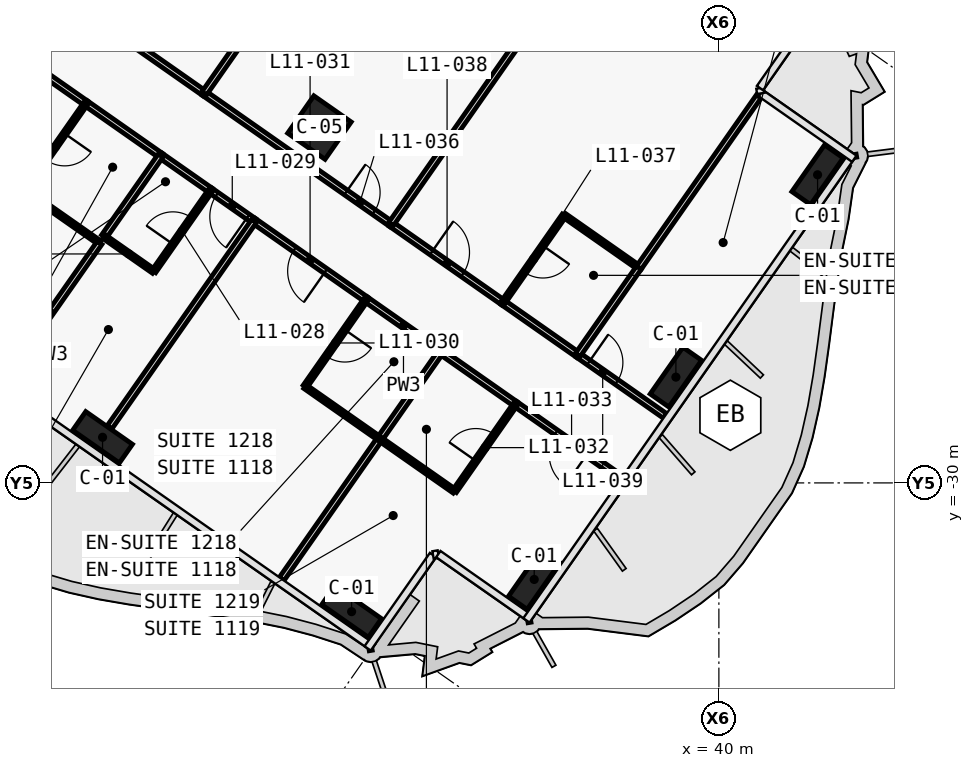
"""IFC4 building model, lengths in metres.
Left out: names, types, materials, properties, quantities, classifications, styles, units other than length and angle.
Written with IfcOpenShell. Run it as: python <this file> out.ifc"""

import sys

from ifc_helpers import new_model, si_unit, direction, frame, frame_2d, origin, origin_2d, place, context, subcontext, project, spatial, rectangle, extrude, element, fill, save


model = new_model("IFC4")
c1 = context("Model", 3, precision=1e-05, world=origin(), true_north=direction((0.0, 1.0)))
c2 = subcontext(c1, "Body", "Model", "MODEL_VIEW")
j1 = project(units=[si_unit("LENGTHUNIT", "METRE"), si_unit("PLANEANGLEUNIT", "RADIAN")], contexts=[c1])
p1 = place(None, origin())
s1 = spatial("IfcSite", under=j1, at=p1, CompositionType="ELEMENT")
p2 = place(p1, origin())
s2 = spatial("IfcBuilding", under=s1, at=p2, CompositionType="ELEMENT")
p3 = place(p2, frame((0.0, 0.0, 65.3)))
s3 = spatial("IfcBuildingStorey", under=s2, at=p3, CompositionType="ELEMENT", Elevation=65.3)
for number, where, z_axis, x_axis in (
    (1, (23.782, -28.799, 0.0), (0.0, 0.0, 1.0), (0.819, -0.574, 0.0)),
    (2, (30.336, -33.388, 0.0), (0.0, 0.0, 1.0), (0.819, -0.574, 0.0)),
    (3, (35.14, -32.541, 0.0), (0.0, 0.0, 1.0), (0.574, 0.819, 0.0)),
    (4, (38.869, -27.216, 0.0), (0.0, 0.0, 1.0), (0.574, 0.819, 0.0)),
    (5, (42.597, -21.892, 0.0), (0.0, 0.0, 1.0), (0.574, 0.819, 0.0)),
):
    element("IfcColumn", number, at=place(p3, frame(where, z_axis=z_axis, x_axis=x_axis)), inside=s3, PredefinedType="COLUMN", context=c2, shape_type="SweptSolid", body=[
        extrude(rectangle(XDim=1.5, YDim=0.6, at=origin_2d()), origin(), (0.0, 0.0, 1.0), 3.6),
    ])
p4 = place(p3, frame((29.49, -20.649, 0.0), z_axis=(0.0, 0.0, 1.0), x_axis=(0.819152044289, -0.573576436351, 0.0)))
e6 = element("IfcColumn", 6, at=p4, inside=s3, PredefinedType="COLUMN", context=c2, shape_type="SweptSolid", body=[
    extrude(rectangle(XDim=1.2, YDim=1.2, at=origin_2d()), origin(), (0.0, 0.0, 1.0), 3.6),
])
p5 = place(p3, frame((24.491, -18.369, 0.0), z_axis=(0.0, 0.0, 1.0), x_axis=(0.819179439794, -0.573537309527, 0.0)))
e7 = element("IfcWall", 7, at=p5, inside=s3, PredefinedType="PARTITIONING", context=c2, shape_type="SweptSolid", body=[
    extrude(rectangle(XDim=2.404, YDim=0.15, at=frame_2d((1.202, 0.0))), origin(), (0.0, 0.0, 1.0), 3.32),
])
p6 = place(p3, frame((26.457, -19.746, 0.0), z_axis=(0.0, 0.0, 1.0), x_axis=(0.819165052243, -0.573557858619, 0.0)))
e8 = element("IfcWall", 8, at=p6, inside=s3, PredefinedType="PARTITIONING", context=c2, shape_type="SweptSolid", body=[
    extrude(rectangle(XDim=6.004, YDim=0.15, at=frame_2d((3.002, 0.0))), origin(), (0.0, 0.0, 1.0), 2.6),
])
p7 = place(p6, frame((4.552, 0.0, 0.0)))
e9 = element("IfcOpeningElement", 9, at=p7, cuts=e8, PredefinedType="OPENING", context=c2, shape_type="SweptSolid", body=[
    extrude(rectangle(XDim=0.9, YDim=2.1, at=frame_2d((0.45, 1.05))), frame((0.0, 0.085, 0.0), z_axis=(0.0, -1.0, 0.0), x_axis=(1.0, 0.0, 0.0)), (0.0, 0.0, 1.0), 0.17),
])
p8 = place(p3, frame((31.372, -23.188, 0.0), z_axis=(0.0, 0.0, 1.0), x_axis=(0.819145961204, -0.573585123798, 0.0)))
e10 = element("IfcWall", 10, at=p8, inside=s3, PredefinedType="PARTITIONING", context=c2, shape_type="SweptSolid", body=[
    extrude(rectangle(XDim=3.603, YDim=0.15, at=frame_2d((1.802, 0.0))), origin(), (0.0, 0.0, 1.0), 3.32),
])
p9 = place(p8, frame((1.302, 0.0, 0.0)))
e11 = element("IfcOpeningElement", 11, at=p9, cuts=e10, PredefinedType="OPENING", context=c2, shape_type="SweptSolid", body=[
    extrude(rectangle(XDim=1.0, YDim=2.1, at=frame_2d((0.5, 1.05))), frame((0.0, 0.085, 0.0), z_axis=(0.0, -1.0, 0.0), x_axis=(1.0, 0.0, 0.0)), (0.0, 0.0, 1.0), 0.17),
])
p10 = place(p3, frame((34.321, -25.252, 0.0), z_axis=(0.0, 0.0, 1.0), x_axis=(0.819160338113, -0.573564591361, 0.0)))
e12 = element("IfcWall", 12, at=p10, inside=s3, PredefinedType="PARTITIONING", context=c2, shape_type="SweptSolid", body=[
    extrude(rectangle(XDim=2.404, YDim=0.15, at=frame_2d((1.202, 0.0))), origin(), (0.0, 0.0, 1.0), 3.32),
])
p11 = place(p3, frame((36.287, -26.629, 0.0), z_axis=(0.0, 0.0, 1.0), x_axis=(0.819137759006, -0.573596837309, 0.0)))
e13 = element("IfcWall", 13, at=p11, inside=s3, PredefinedType="PARTITIONING", context=c2, shape_type="SweptSolid", body=[
    extrude(rectangle(XDim=2.802, YDim=0.15, at=frame_2d((1.401, 0.0))), origin(), (0.0, 0.0, 1.0), 2.5),
])
p12 = place(p11, frame((0.351, 0.0, 0.0)))
e14 = element("IfcOpeningElement", 14, at=p12, cuts=e13, PredefinedType="OPENING", context=c2, shape_type="SweptSolid", body=[
    extrude(rectangle(XDim=0.9, YDim=2.1, at=frame_2d((0.45, 1.05))), frame((0.0, 0.085, 0.0), z_axis=(0.0, -1.0, 0.0), x_axis=(1.0, 0.0, 0.0)), (0.0, 0.0, 1.0), 0.17),
])
p13 = place(p3, frame((23.346, -20.01, 0.0), z_axis=(0.0, 0.0, 1.0), x_axis=(-0.819153746897, 0.573574004767, 0.0)))
e15 = element("IfcWall", 15, at=p13, inside=s3, PredefinedType="PARTITIONING", context=c2, shape_type="SweptSolid", body=[
    extrude(rectangle(XDim=6.603, YDim=0.15, at=frame_2d((3.302, 0.0))), origin(), (0.0, 0.0, 1.0), 2.6),
])
p14 = place(p13, frame((2.801, 0.0, 0.0)))
e16 = element("IfcOpeningElement", 16, at=p14, cuts=e15, PredefinedType="OPENING", context=c2, shape_type="SweptSolid", body=[
    extrude(rectangle(XDim=1.0, YDim=2.1, at=frame_2d((0.5, 1.05))), frame((0.0, 0.085, 0.0), z_axis=(0.0, -1.0, 0.0), x_axis=(1.0, 0.0, 0.0)), (0.0, 0.0, 1.0), 0.17),
])
p15 = place(p3, frame((25.313, -21.387, 0.0), z_axis=(0.0, 0.0, 1.0), x_axis=(-0.819146032251, 0.573585022335, 0.0)))
e17 = element("IfcWall", 17, at=p15, inside=s3, PredefinedType="PARTITIONING", context=c2, shape_type="SweptSolid", body=[
    extrude(rectangle(XDim=2.404, YDim=0.15, at=frame_2d((1.202, 0.0))), origin(), (0.0, 0.0, 1.0), 3.32),
])
p16 = place(p3, frame((27.771, -23.107, 0.0), z_axis=(0.0, 0.0, 1.0), x_axis=(-0.819117471667, 0.573625808005, 0.0)))
e18 = element("IfcWall", 18, at=p16, inside=s3, PredefinedType="PARTITIONING", context=c2, shape_type="SweptSolid", body=[
    extrude(rectangle(XDim=1.403, YDim=0.15, at=frame_2d((0.702, 0.0))), origin(), (0.0, 0.0, 1.0), 2.6),
])
p17 = place(p16, frame((0.202, 0.0, 0.0)))
e19 = element("IfcOpeningElement", 19, at=p17, cuts=e18, PredefinedType="OPENING", context=c2, shape_type="SweptSolid", body=[
    extrude(rectangle(XDim=1.0, YDim=2.1, at=frame_2d((0.5, 1.05))), frame((0.0, 0.085, 0.0), z_axis=(0.0, -1.0, 0.0), x_axis=(1.0, 0.0, 0.0)), (0.0, 0.0, 1.0), 0.17),
])
p18 = place(p3, frame((26.624, -22.304, 0.0), z_axis=(0.0, 0.0, 1.0), x_axis=(-0.819189013667, 0.573523634986, 0.0)))
e20 = element("IfcWall", 20, at=p18, inside=s3, PredefinedType="PARTITIONING", context=c2, shape_type="SweptSolid", body=[
    extrude(rectangle(XDim=1.604, YDim=0.15, at=frame_2d((0.802, 0.0))), origin(), (0.0, 0.0, 1.0), 3.32),
])
p19 = place(p3, frame((30.719, -25.172, 0.0), z_axis=(0.0, 0.0, 1.0), x_axis=(-0.819145961204, 0.573585123798, 0.0)))
e21 = element("IfcWall", 21, at=p19, inside=s3, PredefinedType="PARTITIONING", context=c2, shape_type="SweptSolid", body=[
    extrude(rectangle(XDim=3.603, YDim=0.15, at=frame_2d((1.802, 0.0))), origin(), (0.0, 0.0, 1.0), 2.6),
])
p20 = place(p19, frame((1.301, 0.0, 0.0)))
e22 = element("IfcOpeningElement", 22, at=p20, cuts=e21, PredefinedType="OPENING", context=c2, shape_type="SweptSolid", body=[
    extrude(rectangle(XDim=1.0, YDim=2.1, at=frame_2d((0.5, 1.05))), frame((0.0, 0.085, 0.0), z_axis=(0.0, -1.0, 0.0), x_axis=(1.0, 0.0, 0.0)), (0.0, 0.0, 1.0), 0.17),
])
p21 = place(p3, frame((32.685, -26.549, 0.0), z_axis=(0.0, 0.0, 1.0), x_axis=(-0.819146032251, 0.573585022335, 0.0)))
e23 = element("IfcWall", 23, at=p21, inside=s3, PredefinedType="PARTITIONING", context=c2, shape_type="SweptSolid", body=[
    extrude(rectangle(XDim=2.404, YDim=0.15, at=frame_2d((1.202, 0.0))), origin(), (0.0, 0.0, 1.0), 3.32),
])
p22 = place(p3, frame((37.435, -29.875, 0.0), z_axis=(0.0, 0.0, 1.0), x_axis=(-0.819144234337, 0.573587589957, 0.0)))
e24 = element("IfcWall", 24, at=p22, inside=s3, PredefinedType="PARTITIONING", context=c2, shape_type="SweptSolid", body=[
    extrude(rectangle(XDim=3.401, YDim=0.15, at=frame_2d((1.701, 0.0))), origin(), (0.0, 0.0, 1.0), 2.5),
])
p23 = place(p22, frame((1.1, 0.0, 0.0)))
e25 = element("IfcOpeningElement", 25, at=p23, cuts=e24, PredefinedType="OPENING", context=c2, shape_type="SweptSolid", body=[
    extrude(rectangle(XDim=1.0, YDim=2.1, at=frame_2d((0.5, 1.05))), frame((0.0, 0.085, 0.0), z_axis=(0.0, -1.0, 0.0), x_axis=(1.0, 0.0, 0.0)), (0.0, 0.0, 1.0), 0.17),
])
p24 = place(p3, frame((34.651, -27.925, 0.0), z_axis=(0.0, 0.0, 1.0), x_axis=(-0.819179439794, 0.573537309527, 0.0)))
e26 = element("IfcWall", 26, at=p24, inside=s3, PredefinedType="PARTITIONING", context=c2, shape_type="SweptSolid", body=[
    extrude(rectangle(XDim=2.404, YDim=0.15, at=frame_2d((1.202, 0.0))), origin(), (0.0, 0.0, 1.0), 3.32),
])
p25 = place(p3, frame((28.064, -17.454, 0.0), z_axis=(0.0, 0.0, 1.0), x_axis=(-0.573550118428, -0.819170471667, 0.0)))
e27 = element("IfcWall", 27, at=p25, inside=s3, PredefinedType="PARTITIONING", context=c2, shape_type="SweptSolid", body=[
    extrude(rectangle(XDim=2.8, YDim=0.15, at=frame_2d((1.4, 0.0))), origin(), (0.0, 0.0, 1.0), 2.6),
])
p26 = place(p3, frame((37.855, -13.932, 0.0), z_axis=(0.0, 0.0, 1.0), x_axis=(-0.573571089604, -0.819155788095, 0.0)))
e28 = element("IfcWall", 28, at=p26, inside=s3, PredefinedType="PARTITIONING", context=c2, shape_type="SweptSolid", body=[
    extrude(rectangle(XDim=11.3, YDim=0.15, at=frame_2d((5.65, 0.0))), origin(), (0.0, 0.0, 1.0), 2.5),
])
p27 = place(p3, frame((37.895, -24.336, 0.0), z_axis=(0.0, 0.0, 1.0), x_axis=(-0.819141114317, 0.573592045652, 0.0)))
e29 = element("IfcWall", 29, at=p27, inside=s3, PredefinedType="PARTITIONING", context=c2, shape_type="SweptSolid", body=[
    extrude(rectangle(XDim=2.4, YDim=0.12, at=frame_2d((1.2, 0.0))), origin(), (0.0, 0.0, 1.0), 3.32),
])
p28 = place(p3, frame((35.927, -22.959, 0.0), z_axis=(0.0, 0.0, 1.0), x_axis=(-0.573550118428, -0.819170471667, 0.0)))
e30 = element("IfcWall", 30, at=p28, inside=s3, PredefinedType="PARTITIONING", context=c2, shape_type="SweptSolid", body=[
    extrude(rectangle(XDim=2.8, YDim=0.12, at=frame_2d((1.4, 0.0))), origin(), (0.0, 0.0, 1.0), 2.6),
])
p29 = place(p28, frame((0.975, 0.0, 0.0)))
e31 = element("IfcOpeningElement", 31, at=p29, cuts=e30, PredefinedType="OPENING", context=c2, shape_type="SweptSolid", body=[
    extrude(rectangle(XDim=0.85, YDim=2.05, at=frame_2d((0.425, 1.025))), frame((0.0, 0.07, 0.0), z_axis=(0.0, -1.0, 0.0), x_axis=(1.0, 0.0, 0.0)), (0.0, 0.0, 1.0), 0.14),
])
p30 = place(p3, frame((41.049, -19.831, 0.0), z_axis=(0.0, 0.0, 1.0), x_axis=(-0.573530875885, -0.819183944183, 0.0)))
e32 = element("IfcWall", 32, at=p30, inside=s3, PredefinedType="PARTITIONING", context=c2, shape_type="SweptSolid", body=[
    extrude(rectangle(XDim=5.499, YDim=0.15, at=frame_2d((2.75, 0.0))), origin(), (0.0, 0.0, 1.0), 3.32),
])
p31 = place(p3, frame((37.894, -24.336, 0.0), z_axis=(0.0, 0.0, 1.0), x_axis=(-0.573550118428, -0.819170471667, 0.0)))
e33 = element("IfcWall", 33, at=p31, inside=s3, PredefinedType="PARTITIONING", context=c2, shape_type="SweptSolid", body=[
    extrude(rectangle(XDim=2.8, YDim=0.15, at=frame_2d((1.4, 0.0))), origin(), (0.0, 0.0, 1.0), 2.6),
])
p32 = place(p3, frame((23.344, -20.008, 0.0), z_axis=(0.0, 0.0, 1.0), x_axis=(-0.573550118428, -0.819170471667, 0.0)))
e34 = element("IfcWall", 34, at=p32, inside=s3, PredefinedType="PARTITIONING", context=c2, shape_type="SweptSolid", body=[
    extrude(rectangle(XDim=2.8, YDim=0.12, at=frame_2d((1.4, 0.0))), origin(), (0.0, 0.0, 1.0), 3.32),
])
p33 = place(p32, frame((0.975, 0.0, 0.0)))
e35 = element("IfcOpeningElement", 35, at=p33, cuts=e34, PredefinedType="OPENING", context=c2, shape_type="SweptSolid", body=[
    extrude(rectangle(XDim=0.85, YDim=2.05, at=frame_2d((0.425, 1.025))), frame((0.0, 0.07, 0.0), z_axis=(0.0, -1.0, 0.0), x_axis=(1.0, 0.0, 0.0)), (0.0, 0.0, 1.0), 0.14),
])
p34 = place(p3, frame((21.739, -22.303, 0.0), z_axis=(0.0, 0.0, 1.0), x_axis=(0.819107643868, -0.573639841501, 0.0)))
e36 = element("IfcWall", 36, at=p34, inside=s3, PredefinedType="PARTITIONING", context=c2, shape_type="SweptSolid", body=[
    extrude(rectangle(XDim=2.4, YDim=0.12, at=frame_2d((1.2, 0.0))), origin(), (0.0, 0.0, 1.0), 3.32),
])
p35 = place(p3, frame((23.705, -23.68, 0.0), z_axis=(0.0, 0.0, 1.0), x_axis=(-0.573553393703, -0.819168178442, 0.0)))
e37 = element("IfcWall", 37, at=p35, inside=s3, PredefinedType="PARTITIONING", context=c2, shape_type="SweptSolid", body=[
    extrude(rectangle(XDim=4.499, YDim=0.15, at=frame_2d((2.25, 0.0))), origin(), (0.0, 0.0, 1.0), 2.5),
])
p36 = place(p3, frame((25.311, -21.385, 0.0), z_axis=(0.0, 0.0, 1.0), x_axis=(-0.573588285102, -0.819143747577, 0.0)))
e38 = element("IfcWall", 38, at=p36, inside=s3, PredefinedType="PARTITIONING", context=c2, shape_type="SweptSolid", body=[
    extrude(rectangle(XDim=2.602, YDim=0.15, at=frame_2d((1.301, 0.0))), origin(), (0.0, 0.0, 1.0), 3.32),
])
p37 = place(p3, frame((23.819, -23.516, 0.0), z_axis=(0.0, 0.0, 1.0), x_axis=(0.81918174131, -0.573534022273, 0.0)))
e39 = element("IfcWall", 39, at=p37, inside=s3, PredefinedType="PARTITIONING", context=c2, shape_type="SweptSolid", body=[
    extrude(rectangle(XDim=1.6, YDim=0.12, at=frame_2d((0.8, 0.0))), origin(), (0.0, 0.0, 1.0), 3.32),
])
p38 = place(p3, frame((25.132, -24.434, 0.0), z_axis=(0.0, 0.0, 1.0), x_axis=(0.573537965655, 0.819178980414, 0.0)))
e40 = element("IfcWall", 40, at=p38, inside=s3, PredefinedType="PARTITIONING", context=c2, shape_type="SweptSolid", body=[
    extrude(rectangle(XDim=2.6, YDim=0.12, at=frame_2d((1.3, 0.0))), origin(), (0.0, 0.0, 1.0), 3.32),
])
p39 = place(p38, frame((0.875, 0.0, 0.0)))
e41 = element("IfcOpeningElement", 41, at=p39, cuts=e40, PredefinedType="OPENING", context=c2, shape_type="SweptSolid", body=[
    extrude(rectangle(XDim=0.85, YDim=2.05, at=frame_2d((0.425, 1.025))), frame((0.0, 0.07, 0.0), z_axis=(0.0, -1.0, 0.0), x_axis=(1.0, 0.0, 0.0)), (0.0, 0.0, 1.0), 0.14),
])
p40 = place(p3, frame((27.769, -23.106, 0.0), z_axis=(0.0, 0.0, 1.0), x_axis=(-0.57359826181, -0.819136761505, 0.0)))
e42 = element("IfcWall", 42, at=p40, inside=s3, PredefinedType="PARTITIONING", context=c2, shape_type="SweptSolid", body=[
    extrude(rectangle(XDim=6.63, YDim=0.15, at=frame_2d((3.315, 0.0))), origin(), (0.0, 0.0, 1.0), 2.6),
])
p41 = place(p3, frame((30.717, -25.17, 0.0), z_axis=(0.0, 0.0, 1.0), x_axis=(-0.573550118428, -0.819170471667, 0.0)))
e43 = element("IfcWall", 43, at=p41, inside=s3, PredefinedType="PARTITIONING", context=c2, shape_type="SweptSolid", body=[
    extrude(rectangle(XDim=2.8, YDim=0.12, at=frame_2d((1.4, 0.0))), origin(), (0.0, 0.0, 1.0), 3.32),
])
p42 = place(p41, frame((0.975, 0.0, 0.0)))
e44 = element("IfcOpeningElement", 44, at=p42, cuts=e43, PredefinedType="OPENING", context=c2, shape_type="SweptSolid", body=[
    extrude(rectangle(XDim=0.85, YDim=2.05, at=frame_2d((0.425, 1.025))), frame((0.0, 0.07, 0.0), z_axis=(0.0, -1.0, 0.0), x_axis=(1.0, 0.0, 0.0)), (0.0, 0.0, 1.0), 0.14),
])
p43 = place(p3, frame((29.111, -27.466, 0.0), z_axis=(0.0, 0.0, 1.0), x_axis=(0.819188907105, -0.573523787192, 0.0)))
e45 = element("IfcWall", 45, at=p43, inside=s3, PredefinedType="PARTITIONING", context=c2, shape_type="SweptSolid", body=[
    extrude(rectangle(XDim=2.4, YDim=0.12, at=frame_2d((1.2, 0.0))), origin(), (0.0, 0.0, 1.0), 3.32),
])
p44 = place(p3, frame((31.077, -28.842, 0.0), z_axis=(0.0, 0.0, 1.0), x_axis=(-0.573564311442, -0.819160534108, 0.0)))
e46 = element("IfcWall", 46, at=p44, inside=s3, PredefinedType="PARTITIONING", context=c2, shape_type="SweptSolid", body=[
    extrude(rectangle(XDim=4.499, YDim=0.15, at=frame_2d((2.25, 0.0))), origin(), (0.0, 0.0, 1.0), 2.5),
])
p45 = place(p3, frame((32.684, -26.548, 0.0), z_axis=(0.0, 0.0, 1.0), x_axis=(-0.573550118428, -0.819170471667, 0.0)))
e47 = element("IfcWall", 47, at=p45, inside=s3, PredefinedType="PARTITIONING", context=c2, shape_type="SweptSolid", body=[
    extrude(rectangle(XDim=2.8, YDim=0.15, at=frame_2d((1.4, 0.0))), origin(), (0.0, 0.0, 1.0), 3.32),
])
p46 = place(p3, frame((31.077, -28.842, 0.0), z_axis=(0.0, 0.0, 1.0), x_axis=(0.819107643868, -0.573639841501, 0.0)))
e48 = element("IfcWall", 48, at=p46, inside=s3, PredefinedType="PARTITIONING", context=c2, shape_type="SweptSolid", body=[
    extrude(rectangle(XDim=2.4, YDim=0.12, at=frame_2d((1.2, 0.0))), origin(), (0.0, 0.0, 1.0), 3.32),
])
p47 = place(p3, frame((33.044, -30.219, 0.0), z_axis=(0.0, 0.0, 1.0), x_axis=(0.573550118428, 0.819170471667, 0.0)))
e49 = element("IfcWall", 49, at=p47, inside=s3, PredefinedType="PARTITIONING", context=c2, shape_type="SweptSolid", body=[
    extrude(rectangle(XDim=2.8, YDim=0.12, at=frame_2d((1.4, 0.0))), origin(), (0.0, 0.0, 1.0), 3.32),
])
p48 = place(p47, frame((0.975, 0.0, 0.0)))
e50 = element("IfcOpeningElement", 50, at=p48, cuts=e49, PredefinedType="OPENING", context=c2, shape_type="SweptSolid", body=[
    extrude(rectangle(XDim=0.85, YDim=2.05, at=frame_2d((0.425, 1.025))), frame((0.0, 0.07, 0.0), z_axis=(0.0, -1.0, 0.0), x_axis=(1.0, 0.0, 0.0)), (0.0, 0.0, 1.0), 0.14),
])
p49 = place(p33, origin())
e51 = element("IfcDoor", 51, at=p49, inside=s3, OperationType="SINGLE_SWING_RIGHT", PredefinedType="DOOR", context=c2, shape_type="SweptSolid", body=[
    extrude(rectangle(XDim=0.85, YDim=2.05, at=frame_2d((0.425, 1.025))), frame((0.0, 0.025, 0.0), z_axis=(0.0, -1.0, 0.0), x_axis=(1.0, 0.0, 0.0)), (0.0, 0.0, 1.0), 0.05),
])
fill(e35, e51)
p50 = place(p39, origin())
e52 = element("IfcDoor", 52, at=p50, inside=s3, OperationType="SINGLE_SWING_LEFT", PredefinedType="DOOR", context=c2, shape_type="SweptSolid", body=[
    extrude(rectangle(XDim=0.85, YDim=2.05, at=frame_2d((0.425, 1.025))), frame((0.0, 0.025, 0.0), z_axis=(0.0, -1.0, 0.0), x_axis=(1.0, 0.0, 0.0)), (0.0, 0.0, 1.0), 0.05),
])
fill(e41, e52)
p51 = place(p17, origin())
e53 = element("IfcDoor", 53, at=p51, inside=s3, OperationType="SINGLE_SWING_RIGHT", PredefinedType="DOOR", context=c2, shape_type="SweptSolid", body=[
    extrude(rectangle(XDim=1.0, YDim=2.1, at=frame_2d((0.5, 1.05))), frame((0.0, 0.025, 0.0), z_axis=(0.0, -1.0, 0.0), x_axis=(1.0, 0.0, 0.0)), (0.0, 0.0, 1.0), 0.05),
])
fill(e19, e53)
p52 = place(p42, origin())
e54 = element("IfcDoor", 54, at=p52, inside=s3, OperationType="SINGLE_SWING_RIGHT", PredefinedType="DOOR", context=c2, shape_type="SweptSolid", body=[
    extrude(rectangle(XDim=0.85, YDim=2.05, at=frame_2d((0.425, 1.025))), frame((0.0, 0.025, 0.0), z_axis=(0.0, -1.0, 0.0), x_axis=(1.0, 0.0, 0.0)), (0.0, 0.0, 1.0), 0.05),
])
fill(e44, e54)
p53 = place(p20, origin())
e55 = element("IfcDoor", 55, at=p53, inside=s3, OperationType="SINGLE_SWING_LEFT", PredefinedType="DOOR", context=c2, shape_type="SweptSolid", body=[
    extrude(rectangle(XDim=1.0, YDim=2.1, at=frame_2d((0.5, 1.05))), frame((0.0, 0.025, 0.0), z_axis=(0.0, -1.0, 0.0), x_axis=(1.0, 0.0, 0.0)), (0.0, 0.0, 1.0), 0.05),
])
fill(e22, e55)
p54 = place(p48, origin())
e56 = element("IfcDoor", 56, at=p54, inside=s3, OperationType="SINGLE_SWING_RIGHT", PredefinedType="DOOR", context=c2, shape_type="SweptSolid", body=[
    extrude(rectangle(XDim=0.85, YDim=2.05, at=frame_2d((0.425, 1.025))), frame((0.0, 0.025, 0.0), z_axis=(0.0, -1.0, 0.0), x_axis=(1.0, 0.0, 0.0)), (0.0, 0.0, 1.0), 0.05),
])
fill(e50, e56)
p55 = place(p23, origin())
e57 = element("IfcDoor", 57, at=p55, inside=s3, OperationType="SINGLE_SWING_RIGHT", PredefinedType="DOOR", context=c2, shape_type="SweptSolid", body=[
    extrude(rectangle(XDim=1.0, YDim=2.1, at=frame_2d((0.5, 1.05))), frame((0.0, 0.025, 0.0), z_axis=(0.0, -1.0, 0.0), x_axis=(1.0, 0.0, 0.0)), (0.0, 0.0, 1.0), 0.05),
])
fill(e25, e57)
p56 = place(p7, origin())
e58 = element("IfcDoor", 58, at=p56, inside=s3, OperationType="SINGLE_SWING_RIGHT", PredefinedType="DOOR", context=c2, shape_type="SweptSolid", body=[
    extrude(rectangle(XDim=0.9, YDim=2.1, at=frame_2d((0.45, 1.05))), frame((0.0, 0.025, 0.0), z_axis=(0.0, -1.0, 0.0), x_axis=(1.0, 0.0, 0.0)), (0.0, 0.0, 1.0), 0.05),
])
fill(e9, e58)
p57 = place(p29, origin())
e59 = element("IfcDoor", 59, at=p57, inside=s3, OperationType="SINGLE_SWING_LEFT", PredefinedType="DOOR", context=c2, shape_type="SweptSolid", body=[
    extrude(rectangle(XDim=0.85, YDim=2.05, at=frame_2d((0.425, 1.025))), frame((0.0, 0.025, 0.0), z_axis=(0.0, -1.0, 0.0), x_axis=(1.0, 0.0, 0.0)), (0.0, 0.0, 1.0), 0.05),
])
fill(e31, e59)
p58 = place(p9, origin())
e60 = element("IfcDoor", 60, at=p58, inside=s3, OperationType="SINGLE_SWING_RIGHT", PredefinedType="DOOR", context=c2, shape_type="SweptSolid", body=[
    extrude(rectangle(XDim=1.0, YDim=2.1, at=frame_2d((0.5, 1.05))), frame((0.0, 0.025, 0.0), z_axis=(0.0, -1.0, 0.0), x_axis=(1.0, 0.0, 0.0)), (0.0, 0.0, 1.0), 0.05),
])
fill(e11, e60)
p59 = place(p12, origin())
e61 = element("IfcDoor", 61, at=p59, inside=s3, OperationType="SINGLE_SWING_LEFT", PredefinedType="DOOR", context=c2, shape_type="SweptSolid", body=[
    extrude(rectangle(XDim=0.9, YDim=2.1, at=frame_2d((0.45, 1.05))), frame((0.0, 0.025, 0.0), z_axis=(0.0, -1.0, 0.0), x_axis=(1.0, 0.0, 0.0)), (0.0, 0.0, 1.0), 0.05),
])
fill(e14, e61)
save(model, sys.argv[1])
